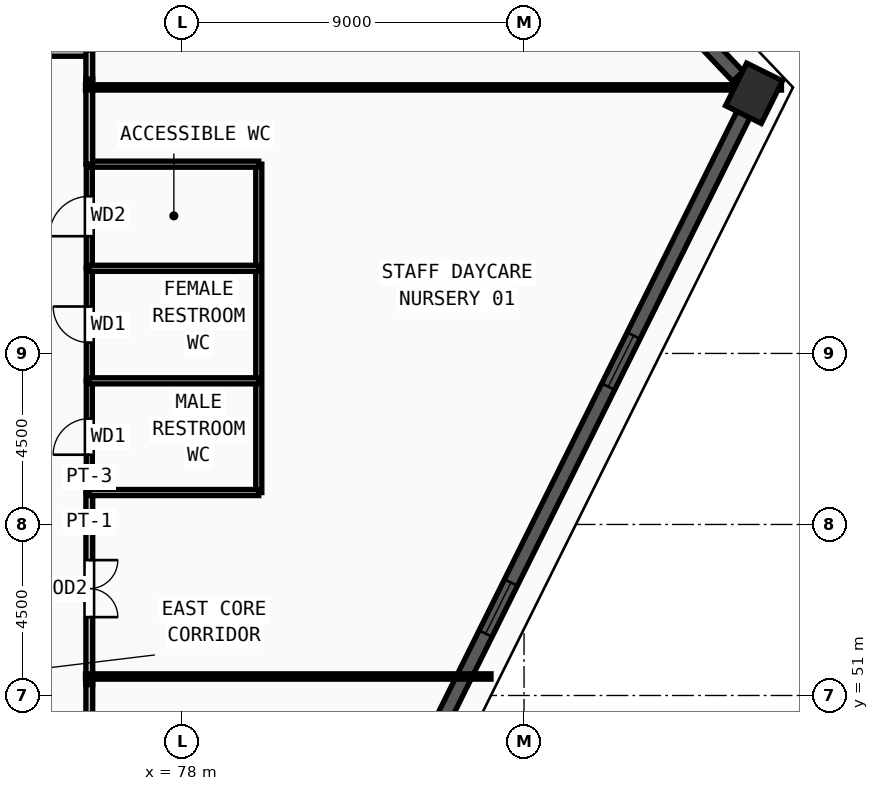
"""IFC4 building model, lengths in metres.
Left out: names, types, materials, properties, quantities, classifications, styles, units other than length and angle.
Written with IfcOpenShell. Run it as: python <this file> out.ifc"""

import sys

from ifc_helpers import new_model, si_unit, direction, frame, frame_2d, origin, origin_2d, place, context, subcontext, project, spatial, rectangle, extrude, source, transform, mapped, element, fill, save


model = new_model("IFC4")
c1 = context("Model", 3, precision=1e-05, world=origin(), true_north=direction((0.0, 1.0)))
c2 = subcontext(c1, "Body", "Model", "MODEL_VIEW")
j1 = project(units=[si_unit("LENGTHUNIT", "METRE"), si_unit("PLANEANGLEUNIT", "RADIAN")], contexts=[c1])
p1 = place(None, origin())
s1 = spatial("IfcSite", under=j1, at=p1, CompositionType="ELEMENT")
p2 = place(p1, origin())
s2 = spatial("IfcBuilding", under=s1, at=p2, CompositionType="ELEMENT")
p3 = place(p2, frame((0.0, 0.0, 224.25)))
s3 = spatial("IfcBuildingStorey", under=s2, at=p3, CompositionType="ELEMENT", Elevation=224.25)
m1 = source(origin(), c2, "Body", "SweptSolid", [
    extrude(rectangle(XDim=1.25, YDim=1.05, at=origin_2d()), origin(), (0.0, 0.0, 1.0), 3.75),
])
p4 = place(p3, frame((93.051, 66.846, 0.0), z_axis=(0.0, 0.0, 1.0), x_axis=(0.444947814477, 0.895556498716, 0.0)))
e1 = element("IfcColumn", 1, at=p4, inside=s3, PredefinedType="COLUMN", context=c2, shape_type="MappedRepresentation", body=[
    mapped(m1, transform((0.0, 0.0, 0.0), x_axis=(1.0, 0.0, 0.0), y_axis=(0.0, 1.0, 0.0), z_axis=(0.0, 0.0, 1.0), scale=1.0)),
])
p5 = place(p3, frame((79.867, 40.305, 0.0), z_axis=(0.0, 0.0, 1.0), x_axis=(0.444873284972, 0.895593524049, 0.0)))
e2 = element("IfcWall", 2, at=p5, inside=s3, PredefinedType="SOLIDWALL", context=c2, shape_type="SweptSolid", body=[
    extrude(rectangle(XDim=29.02, YDim=0.38, at=frame_2d((14.51, 0.0))), origin(), (0.0, 0.0, 1.0), 3.57),
])
m2 = source(origin(), c2, "Body", "SweptSolid", [
    extrude(rectangle(XDim=1.5, YDim=1.9, at=frame_2d((0.75, 0.95))), frame((0.0, 0.2, 0.0), z_axis=(0.0, -1.0, 0.0), x_axis=(1.0, 0.0, 0.0)), (0.0, 0.0, 1.0), 0.4),
])
p6 = place(p5, frame((6.505, 0.0, 0.55)))
e3 = element("IfcOpeningElement", 3, at=p6, cuts=e2, PredefinedType="OPENING", context=c2, shape_type="MappedRepresentation", body=[
    mapped(m2, transform((0.0, 0.0, 0.0), x_axis=(1.0, 0.0, 0.0), y_axis=(0.0, 1.0, 0.0), z_axis=(0.0, 0.0, 1.0), scale=1.0)),
])
p7 = place(p5, frame((13.76, 0.0, 0.55)))
e4 = element("IfcOpeningElement", 4, at=p7, cuts=e2, PredefinedType="OPENING", context=c2, shape_type="MappedRepresentation", body=[
    mapped(m2, transform((0.0, 0.0, 0.0), x_axis=(1.0, 0.0, 0.0), y_axis=(0.0, 1.0, 0.0), z_axis=(0.0, 0.0, 1.0), scale=1.0)),
])
p8 = place(p5, frame((21.015, 0.0, 0.55)))
e5 = element("IfcOpeningElement", 5, at=p8, cuts=e2, PredefinedType="OPENING", context=c2, shape_type="MappedRepresentation", body=[
    mapped(m2, transform((0.0, 0.0, 0.0), x_axis=(1.0, 0.0, 0.0), y_axis=(0.0, 1.0, 0.0), z_axis=(0.0, 0.0, 1.0), scale=1.0)),
])
p9 = place(p3, frame((92.627, 67.292, 0.0), z_axis=(0.0, 0.0, 1.0), x_axis=(-0.689302673128, 0.724473481101, 0.0)))
e6 = element("IfcWall", 6, at=p9, inside=s3, PredefinedType="SOLIDWALL", context=c2, shape_type="SweptSolid", body=[
    extrude(rectangle(XDim=4.325, YDim=0.38, at=frame_2d((2.162, 0.0))), origin(), (0.0, 0.0, 1.0), 3.57),
])
m3 = source(origin(), c2, "Body", "SweptSolid", [
    extrude(rectangle(XDim=1.2, YDim=1.9, at=frame_2d((0.6, 0.95))), frame((0.0, 0.2, 0.0), z_axis=(0.0, -1.0, 0.0), x_axis=(1.0, 0.0, 0.0)), (0.0, 0.0, 1.0), 0.4),
])
p10 = place(p9, frame((1.562, 0.0, 0.55)))
e7 = element("IfcOpeningElement", 7, at=p10, cuts=e6, PredefinedType="OPENING", context=c2, shape_type="MappedRepresentation", body=[
    mapped(m3, transform((0.0, 0.0, 0.0), x_axis=(1.0, 0.0, 0.0), y_axis=(0.0, 1.0, 0.0), z_axis=(0.0, 0.0, 1.0), scale=1.0)),
])
p11 = place(p3, frame((75.56, 56.34, 0.0), z_axis=(0.0, 0.0, 1.0), x_axis=(0.0, 1.0, 0.0)))
e8 = element("IfcWall", 8, at=p11, inside=s3, PredefinedType="PARTITIONING", context=c2, shape_type="SweptSolid", body=[
    extrude(rectangle(XDim=2.94, YDim=0.16, at=frame_2d((1.47, 0.0))), origin(), (0.0, 0.0, 1.0), 3.57),
])
m4 = source(origin(), c2, "Body", "SweptSolid", [
    extrude(rectangle(XDim=0.95, YDim=2.15, at=frame_2d((0.475, 1.075))), frame((0.0, 0.09, 0.0), z_axis=(0.0, -1.0, 0.0), x_axis=(1.0, 0.0, 0.0)), (0.0, 0.0, 1.0), 0.18),
])
p12 = place(p11, frame((0.995, 0.0, 0.0)))
e9 = element("IfcOpeningElement", 9, at=p12, cuts=e8, PredefinedType="OPENING", context=c2, shape_type="MappedRepresentation", body=[
    mapped(m4, transform((0.0, 0.0, 0.0), x_axis=(1.0, 0.0, 0.0), y_axis=(0.0, 1.0, 0.0), z_axis=(0.0, 0.0, 1.0), scale=1.0)),
])
p13 = place(p3, frame((75.56, 59.28, 0.0), z_axis=(0.0, 0.0, 1.0), x_axis=(0.0, 1.0, 0.0)))
e10 = element("IfcWall", 10, at=p13, inside=s3, PredefinedType="PARTITIONING", context=c2, shape_type="SweptSolid", body=[
    extrude(rectangle(XDim=2.96, YDim=0.16, at=frame_2d((1.48, 0.0))), origin(), (0.0, 0.0, 1.0), 3.57),
])
p14 = place(p13, frame((1.005, 0.0, 0.0)))
e11 = element("IfcOpeningElement", 11, at=p14, cuts=e10, PredefinedType="OPENING", context=c2, shape_type="MappedRepresentation", body=[
    mapped(m4, transform((0.0, 0.0, 0.0), x_axis=(1.0, 0.0, 0.0), y_axis=(0.0, 1.0, 0.0), z_axis=(0.0, 0.0, 1.0), scale=1.0)),
])
p15 = place(p3, frame((75.56, 62.24, 0.0), z_axis=(0.0, 0.0, 1.0), x_axis=(0.0, 1.0, 0.0)))
e12 = element("IfcWall", 12, at=p15, inside=s3, PredefinedType="PARTITIONING", context=c2, shape_type="SweptSolid", body=[
    extrude(rectangle(XDim=2.74, YDim=0.16, at=frame_2d((1.37, 0.0))), origin(), (0.0, 0.0, 1.0), 3.57),
])
m5 = source(origin(), c2, "Body", "SweptSolid", [
    extrude(rectangle(XDim=1.05, YDim=2.15, at=frame_2d((0.525, 1.075))), frame((0.0, 0.09, 0.0), z_axis=(0.0, -1.0, 0.0), x_axis=(1.0, 0.0, 0.0)), (0.0, 0.0, 1.0), 0.18),
])
p16 = place(p15, frame((0.845, 0.0, 0.0)))
e13 = element("IfcOpeningElement", 13, at=p16, cuts=e12, PredefinedType="OPENING", context=c2, shape_type="MappedRepresentation", body=[
    mapped(m5, transform((0.0, 0.0, 0.0), x_axis=(1.0, 0.0, 0.0), y_axis=(0.0, 1.0, 0.0), z_axis=(0.0, 0.0, 1.0), scale=1.0)),
])
p17 = place(p3, frame((75.56, 56.34, 0.0), z_axis=(0.0, 0.0, 1.0), x_axis=(0.0, -1.0, 0.0)))
e14 = element("IfcWall", 14, at=p17, inside=s3, PredefinedType="PARTITIONING", context=c2, shape_type="SweptSolid", body=[
    extrude(rectangle(XDim=5.055, YDim=0.18, at=frame_2d((2.528, 0.0))), origin(), (0.0, 0.0, 1.0), 3.57),
])
m6 = source(origin(), c2, "Body", "SweptSolid", [
    extrude(rectangle(XDim=1.5, YDim=2.2, at=frame_2d((0.75, 1.1))), frame((0.0, 0.1, 0.0), z_axis=(0.0, -1.0, 0.0), x_axis=(1.0, 0.0, 0.0)), (0.0, 0.0, 1.0), 0.2),
])
p18 = place(p17, frame((1.778, 0.0, 0.0)))
e15 = element("IfcOpeningElement", 15, at=p18, cuts=e14, PredefinedType="OPENING", context=c2, shape_type="MappedRepresentation", body=[
    mapped(m6, transform((0.0, 0.0, 0.0), x_axis=(1.0, 0.0, 0.0), y_axis=(0.0, 1.0, 0.0), z_axis=(0.0, 0.0, 1.0), scale=1.0)),
])
p19 = place(p3, frame((69.785, 67.91, 0.0), z_axis=(0.0, 0.0, 1.0), x_axis=(1.0, 0.0, 0.0)))
e16 = element("IfcWall", 16, at=p19, inside=s3, PredefinedType="PARTITIONING", context=c2, shape_type="SweptSolid", body=[
    extrude(rectangle(XDim=5.845, YDim=0.18, at=frame_2d((2.922, 0.0))), origin(), (0.0, 0.0, 1.0), 3.57),
])
p20 = place(p19, frame((2.172, 0.0, 0.0)))
e17 = element("IfcOpeningElement", 17, at=p20, cuts=e16, PredefinedType="OPENING", context=c2, shape_type="MappedRepresentation", body=[
    mapped(m6, transform((0.0, 0.0, 0.0), x_axis=(1.0, 0.0, 0.0), y_axis=(0.0, 1.0, 0.0), z_axis=(0.0, 0.0, 1.0), scale=1.0)),
])
p21 = place(p3, frame((75.56, 51.285, 0.0), z_axis=(0.0, 0.0, 1.0), x_axis=(0.0, -1.0, 0.0)))
e18 = element("IfcWall", 18, at=p21, inside=s3, PredefinedType="PARTITIONING", context=c2, shape_type="SweptSolid", body=[
    extrude(rectangle(XDim=6.5, YDim=0.18, at=frame_2d((3.25, 0.0))), origin(), (0.0, 0.0, 1.0), 3.57),
])
m7 = source(origin(), c2, "Body", "SweptSolid", [
    extrude(rectangle(XDim=1.0, YDim=2.2, at=frame_2d((0.5, 1.1))), frame((0.0, 0.1, 0.0), z_axis=(0.0, -1.0, 0.0), x_axis=(1.0, 0.0, 0.0)), (0.0, 0.0, 1.0), 0.2),
])
p22 = place(p21, frame((2.75, 0.0, 0.0)))
e19 = element("IfcOpeningElement", 19, at=p22, cuts=e18, PredefinedType="OPENING", context=c2, shape_type="MappedRepresentation", body=[
    mapped(m7, transform((0.0, 0.0, 0.0), x_axis=(1.0, 0.0, 0.0), y_axis=(0.0, 1.0, 0.0), z_axis=(0.0, 0.0, 1.0), scale=1.0)),
])
p23 = place(p3, frame((80.02, 56.34, 0.0), z_axis=(0.0, 0.0, 1.0), x_axis=(0.0, 1.0, 0.0)))
e20 = element("IfcWall", 20, at=p23, inside=s3, PredefinedType="PARTITIONING", context=c2, shape_type="SweptSolid", body=[
    extrude(rectangle(XDim=8.64, YDim=0.16, at=frame_2d((4.32, 0.0))), origin(), (0.0, 0.0, 1.0), 3.57),
])
for number, where, z_axis, x_axis in (
    (21, (75.56, 56.34, 0.0), (0.0, 0.0, 1.0), (1.0, 0.0, 0.0)),
    (22, (75.56, 59.28, 0.0), (0.0, 0.0, 1.0), (1.0, 0.0, 0.0)),
    (23, (75.56, 62.24, 0.0), (0.0, 0.0, 1.0), (1.0, 0.0, 0.0)),
    (24, (75.56, 64.98, 0.0), (0.0, 0.0, 1.0), (1.0, 0.0, 0.0)),
):
    element("IfcWall", number, at=place(p3, frame(where, z_axis=z_axis, x_axis=x_axis)), inside=s3, PredefinedType="PARTITIONING", context=c2, shape_type="SweptSolid", body=[
        extrude(rectangle(XDim=4.46, YDim=0.16, at=frame_2d((2.23, 0.0))), origin(), (0.0, 0.0, 1.0), 3.57),
    ])
p24 = place(p3, frame((75.56, 67.215, 0.0), z_axis=(0.0, 0.0, 1.0), x_axis=(0.0, -1.0, 0.0)))
e25 = element("IfcWall", 25, at=p24, inside=s3, PredefinedType="PARTITIONING", context=c2, shape_type="SweptSolid", body=[
    extrude(rectangle(XDim=2.235, YDim=0.18, at=frame_2d((1.118, 0.0))), origin(), (0.0, 0.0, 1.0), 3.57),
])
p25 = place(p3, frame((75.56, 67.98, 0.0), z_axis=(0.0, 0.0, 1.0), x_axis=(0.0, -1.0, 0.0)))
e26 = element("IfcWall", 26, at=p25, inside=s3, PredefinedType="PARTITIONING", context=c2, shape_type="SweptSolid", body=[
    extrude(rectangle(XDim=0.765, YDim=0.18, at=frame_2d((0.382, 0.0))), origin(), (0.0, 0.0, 1.0), 3.57),
])
p26 = place(p3, frame((75.46, 51.5, 0.0), z_axis=(0.0, 0.0, 1.0), x_axis=(1.0, 0.0, 0.0)))
e27 = element("IfcWall", 27, at=p26, inside=s3, PredefinedType="PARTITIONING", context=c2, shape_type="SweptSolid", body=[
    extrude(rectangle(XDim=10.671, YDim=0.14, at=frame_2d((5.335, 0.0))), origin(), (0.0, 0.0, 1.0), 3.57),
])
p27 = place(p3, frame((75.46, 67.0, 0.0), z_axis=(0.0, 0.0, 1.0), x_axis=(1.0, 0.0, 0.0)))
e28 = element("IfcWall", 28, at=p27, inside=s3, PredefinedType="PARTITIONING", context=c2, shape_type="SweptSolid", body=[
    extrude(rectangle(XDim=18.314, YDim=0.14, at=frame_2d((9.157, 0.0))), origin(), (0.0, 0.0, 1.0), 3.57),
])
m8 = source(origin(), c2, "Body", "SweptSolid", [
    extrude(rectangle(XDim=1.5, YDim=1.9, at=frame_2d((0.75, 0.95))), frame((0.0, 0.03, 0.0), z_axis=(0.0, -1.0, 0.0), x_axis=(1.0, 0.0, 0.0)), (0.0, 0.0, 1.0), 0.06),
])
p28 = place(p7, origin())
e29 = element("IfcWindow", 29, at=p28, inside=s3, PartitioningType="DOUBLE_PANEL_VERTICAL", PredefinedType="WINDOW", context=c2, shape_type="MappedRepresentation", body=[
    mapped(m8, transform((0.0, 0.0, 0.0), x_axis=(1.0, 0.0, 0.0), y_axis=(0.0, 1.0, 0.0), z_axis=(0.0, 0.0, 1.0), scale=1.0)),
])
fill(e4, e29)
p29 = place(p8, origin())
e30 = element("IfcWindow", 30, at=p29, inside=s3, PartitioningType="DOUBLE_PANEL_VERTICAL", PredefinedType="WINDOW", context=c2, shape_type="MappedRepresentation", body=[
    mapped(m8, transform((0.0, 0.0, 0.0), x_axis=(1.0, 0.0, 0.0), y_axis=(0.0, 1.0, 0.0), z_axis=(0.0, 0.0, 1.0), scale=1.0)),
])
fill(e5, e30)
m9 = source(origin(), c2, "Body", "SweptSolid", [
    extrude(rectangle(XDim=0.95, YDim=2.15, at=frame_2d((0.475, 1.075))), frame((0.0, 0.025, 0.0), z_axis=(0.0, -1.0, 0.0), x_axis=(1.0, 0.0, 0.0)), (0.0, 0.0, 1.0), 0.05),
])
p30 = place(p12, origin())
e31 = element("IfcDoor", 31, at=p30, inside=s3, OperationType="SINGLE_SWING_LEFT", PredefinedType="DOOR", context=c2, shape_type="MappedRepresentation", body=[
    mapped(m9, transform((0.0, 0.0, 0.0), x_axis=(1.0, 0.0, 0.0), y_axis=(0.0, 1.0, 0.0), z_axis=(0.0, 0.0, 1.0), scale=1.0)),
])
fill(e9, e31)
p31 = place(p14, origin())
e32 = element("IfcDoor", 32, at=p31, inside=s3, OperationType="SINGLE_SWING_RIGHT", PredefinedType="DOOR", context=c2, shape_type="MappedRepresentation", body=[
    mapped(m9, transform((0.0, 0.0, 0.0), x_axis=(1.0, 0.0, 0.0), y_axis=(0.0, 1.0, 0.0), z_axis=(0.0, 0.0, 1.0), scale=1.0)),
])
fill(e11, e32)
m10 = source(origin(), c2, "Body", "SweptSolid", [
    extrude(rectangle(XDim=1.05, YDim=2.15, at=frame_2d((0.525, 1.075))), frame((0.0, 0.025, 0.0), z_axis=(0.0, -1.0, 0.0), x_axis=(1.0, 0.0, 0.0)), (0.0, 0.0, 1.0), 0.05),
])
p32 = place(p16, origin())
e33 = element("IfcDoor", 33, at=p32, inside=s3, OperationType="SINGLE_SWING_LEFT", PredefinedType="DOOR", context=c2, shape_type="MappedRepresentation", body=[
    mapped(m10, transform((0.0, 0.0, 0.0), x_axis=(1.0, 0.0, 0.0), y_axis=(0.0, 1.0, 0.0), z_axis=(0.0, 0.0, 1.0), scale=1.0)),
])
fill(e13, e33)
m11 = source(origin(), c2, "Body", "SweptSolid", [
    extrude(rectangle(XDim=1.5, YDim=2.2, at=frame_2d((0.75, 1.1))), frame((0.0, 0.025, 0.0), z_axis=(0.0, -1.0, 0.0), x_axis=(1.0, 0.0, 0.0)), (0.0, 0.0, 1.0), 0.05),
])
p33 = place(p18, origin())
e34 = element("IfcDoor", 34, at=p33, inside=s3, OperationType="DOUBLE_DOOR_SINGLE_SWING", PredefinedType="DOOR", context=c2, shape_type="MappedRepresentation", body=[
    mapped(m11, transform((0.0, 0.0, 0.0), x_axis=(1.0, 0.0, 0.0), y_axis=(0.0, 1.0, 0.0), z_axis=(0.0, 0.0, 1.0), scale=1.0)),
])
fill(e15, e34)
save(model, sys.argv[1])
